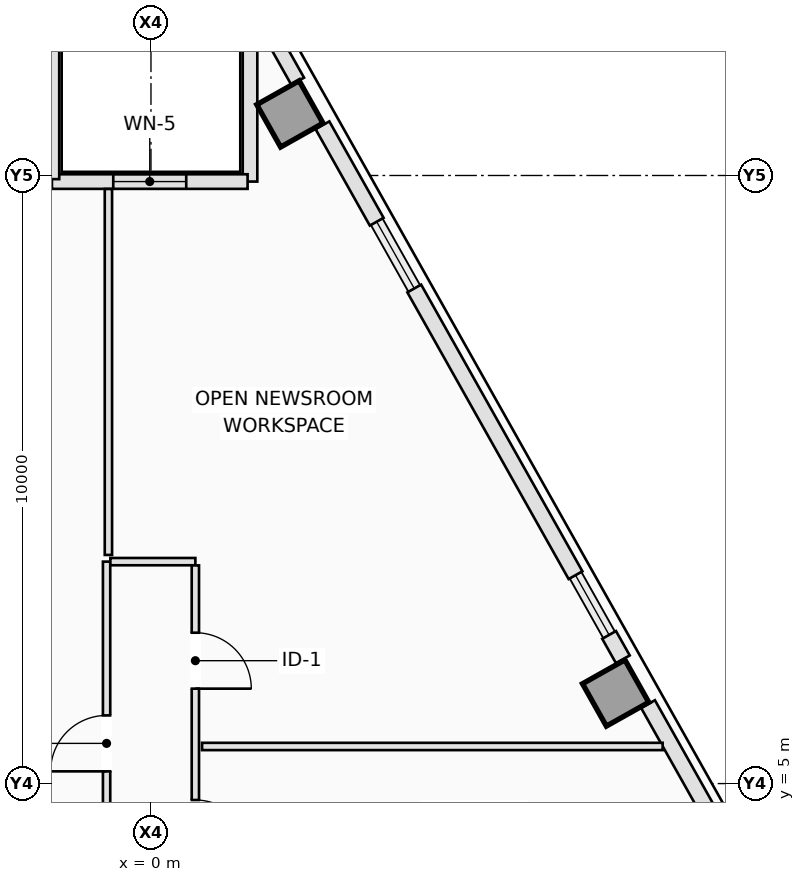
"""IFC4 building model, lengths in metres.
Left out: names, types, materials, properties, quantities, classifications, styles, units other than length and angle.
Written with IfcOpenShell. Run it as: python <this file> out.ifc"""

import sys

from ifc_helpers import new_model, si_unit, direction, frame, frame_2d, origin, origin_2d, place, context, subcontext, project, spatial, rectangle, extrude, element, fill, save


model = new_model("IFC4")
c1 = context("Model", 3, precision=1e-05, world=origin(), true_north=direction((0.0, 1.0)))
c2 = subcontext(c1, "Body", "Model", "MODEL_VIEW")
j1 = project(units=[si_unit("LENGTHUNIT", "METRE"), si_unit("PLANEANGLEUNIT", "RADIAN")], contexts=[c1])
p1 = place(None, origin())
s1 = spatial("IfcSite", under=j1, at=p1, CompositionType="ELEMENT")
p2 = place(p1, origin())
s2 = spatial("IfcBuilding", under=s1, at=p2, CompositionType="ELEMENT")
p3 = place(p2, frame((0.0, 0.0, 228.9)))
s3 = spatial("IfcBuildingStorey", under=s2, at=p3, CompositionType="ELEMENT", Elevation=228.9)
for number, where, z_axis, x_axis in (
    (1, (7.642, 6.489, 0.0), (0.0, 0.0, 1.0), (0.872, 0.49, 0.0)),
    (2, (2.285, 16.012, 0.0), (0.0, 0.0, 1.0), (0.872, 0.49, 0.0)),
):
    element("IfcColumn", number, at=place(p3, frame(where, z_axis=z_axis, x_axis=x_axis)), inside=s3, PredefinedType="COLUMN", context=c2, shape_type="SweptSolid", body=[
        extrude(rectangle(XDim=0.8, YDim=0.8, at=origin_2d()), origin(), (0.0, 0.0, 1.0), 3.5),
    ])
p4 = place(p3, frame((1.95, 17.373, 0.0), z_axis=(0.0, 0.0, 1.0), x_axis=(0.490199895283, -0.871610040479, 0.0)))
e3 = element("IfcWall", 3, at=p4, inside=s3, PredefinedType="STANDARD", context=c2, shape_type="SweptSolid", body=[
    extrude(rectangle(XDim=0.945, YDim=0.24, at=frame_2d((0.472, 0.0))), origin(), (0.0, 0.0, 1.0), 3.25),
])
p5 = place(p3, frame((2.82, 15.826, 0.0), z_axis=(0.0, 0.0, 1.0), x_axis=(0.490261239633, -0.871575537125, 0.0)))
e4 = element("IfcWall", 4, at=p5, inside=s3, PredefinedType="STANDARD", context=c2, shape_type="SweptSolid", body=[
    extrude(rectangle(XDim=1.82, YDim=0.26, at=frame_2d((0.91, 0.0))), origin(), (0.0, 0.0, 1.0), 3.25),
])
p6 = place(p3, frame((4.33, 13.142, 0.0), z_axis=(0.0, 0.0, 1.0), x_axis=(0.490265525523, -0.871573126297, 0.0)))
e5 = element("IfcWall", 5, at=p6, inside=s3, PredefinedType="STANDARD", context=c2, shape_type="SweptSolid", body=[
    extrude(rectangle(XDim=5.409, YDim=0.26, at=frame_2d((2.705, 0.0))), origin(), (0.0, 0.0, 1.0), 3.25),
])
p7 = place(p3, frame((7.534, 7.445, 0.0), z_axis=(0.0, 0.0, 1.0), x_axis=(0.490412424957, -0.871490478116, 0.0)))
e6 = element("IfcWall", 6, at=p7, inside=s3, PredefinedType="STANDARD", context=c2, shape_type="SweptSolid", body=[
    extrude(rectangle(XDim=0.46, YDim=0.26, at=frame_2d((0.23, 0.0))), origin(), (0.0, 0.0, 1.0), 3.25),
])
p8 = place(p3, frame((8.174, 6.307, 0.0), z_axis=(0.0, 0.0, 1.0), x_axis=(0.490269447258, -0.871570920284, 0.0)))
e7 = element("IfcWall", 7, at=p8, inside=s3, PredefinedType="STANDARD", context=c2, shape_type="SweptSolid", body=[
    extrude(rectangle(XDim=4.237, YDim=0.26, at=frame_2d((2.118, 0.0))), origin(), (0.0, 0.0, 1.0), 3.25),
])
p9 = place(p3, frame((1.629, 17.4, 0.0), z_axis=(0.0, 0.0, 1.0), x_axis=(0.0, -1.0, 0.0)))
e8 = element("IfcWall", 8, at=p9, inside=s3, PredefinedType="STANDARD", context=c2, shape_type="SweptSolid", body=[
    extrude(rectangle(XDim=2.5, YDim=0.24, at=frame_2d((1.25, 0.0))), origin(), (0.0, 0.0, 1.0), 3.25),
])
p10 = place(p3, frame((1.589, 14.9, 0.0), z_axis=(0.0, 0.0, 1.0), x_axis=(-1.0, 0.0, 0.0)))
e9 = element("IfcWall", 9, at=p10, inside=s3, PredefinedType="STANDARD", context=c2, shape_type="SweptSolid", body=[
    extrude(rectangle(XDim=3.218, YDim=0.24, at=frame_2d((1.609, 0.0))), origin(), (0.0, 0.0, 1.0), 3.25),
])
p11 = place(p10, frame((1.009, 0.0, 0.9)))
e10 = element("IfcOpeningElement", 10, at=p11, cuts=e9, PredefinedType="OPENING", context=c2, shape_type="SweptSolid", body=[
    extrude(rectangle(XDim=1.2, YDim=1.8, at=frame_2d((0.6, 0.9))), frame((0.0, 0.13, 0.0), z_axis=(0.0, -1.0, 0.0), x_axis=(1.0, 0.0, 0.0)), (0.0, 0.0, 1.0), 0.26),
])
p12 = place(p3, frame((-1.629, 14.94, 0.0), z_axis=(0.0, 0.0, 1.0), x_axis=(0.0, 1.0, 0.0)))
e11 = element("IfcWall", 11, at=p12, inside=s3, PredefinedType="STANDARD", context=c2, shape_type="SweptSolid", body=[
    extrude(rectangle(XDim=2.46, YDim=0.24, at=frame_2d((1.23, 0.0))), origin(), (0.0, 0.0, 1.0), 3.25),
])
p13 = place(p3, frame((-0.73, -2.668, 0.0), z_axis=(0.0, 0.0, 1.0), x_axis=(0.0, 1.0, 0.0)))
e12 = element("IfcWall", 12, at=p13, inside=s3, PredefinedType="PARTITIONING", context=c2, shape_type="SweptSolid", body=[
    extrude(rectangle(XDim=11.318, YDim=0.12, at=frame_2d((5.659, 0.0))), origin(), (0.0, 0.0, 1.0), 3.25),
])
p14 = place(p13, frame((7.869, 0.0, 0.0)))
e13 = element("IfcOpeningElement", 13, at=p14, cuts=e12, PredefinedType="OPENING", context=c2, shape_type="SweptSolid", body=[
    extrude(rectangle(XDim=0.92, YDim=2.12, at=frame_2d((0.46, 1.06))), frame((0.0, 0.07, 0.0), z_axis=(0.0, -1.0, 0.0), x_axis=(1.0, 0.0, 0.0)), (0.0, 0.0, 1.0), 0.14),
])
p15 = place(p13, frame((2.417, 0.0, 0.0)))
e14 = element("IfcOpeningElement", 14, at=p15, cuts=e12, PredefinedType="OPENING", context=c2, shape_type="SweptSolid", body=[
    extrude(rectangle(XDim=0.92, YDim=2.12, at=frame_2d((0.46, 1.06))), frame((0.0, 0.07, 0.0), z_axis=(0.0, -1.0, 0.0), x_axis=(1.0, 0.0, 0.0)), (0.0, 0.0, 1.0), 0.14),
])
p16 = place(p3, frame((-0.668, 8.65, 0.0), z_axis=(0.0, 0.0, 1.0), x_axis=(1.0, 0.0, 0.0)))
e15 = element("IfcWall", 15, at=p16, inside=s3, PredefinedType="PARTITIONING", context=c2, shape_type="SweptSolid", body=[
    extrude(rectangle(XDim=1.398, YDim=0.12, at=frame_2d((0.699, 0.0))), origin(), (0.0, 0.0, 1.0), 3.25),
])
p17 = place(p3, frame((0.73, 8.588, 0.0), z_axis=(0.0, 0.0, 1.0), x_axis=(0.0, -1.0, 0.0)))
e16 = element("IfcWall", 16, at=p17, inside=s3, PredefinedType="PARTITIONING", context=c2, shape_type="SweptSolid", body=[
    extrude(rectangle(XDim=11.318, YDim=0.12, at=frame_2d((5.659, 0.0))), origin(), (0.0, 0.0, 1.0), 3.25),
])
p18 = place(p17, frame((1.107, 0.0, 0.0)))
e17 = element("IfcOpeningElement", 17, at=p18, cuts=e16, PredefinedType="OPENING", context=c2, shape_type="SweptSolid", body=[
    extrude(rectangle(XDim=0.92, YDim=2.12, at=frame_2d((0.46, 1.06))), frame((0.0, 0.07, 0.0), z_axis=(0.0, -1.0, 0.0), x_axis=(1.0, 0.0, 0.0)), (0.0, 0.0, 1.0), 0.14),
])
p19 = place(p17, frame((3.858, 0.0, 0.0)))
e18 = element("IfcOpeningElement", 18, at=p19, cuts=e16, PredefinedType="OPENING", context=c2, shape_type="SweptSolid", body=[
    extrude(rectangle(XDim=0.92, YDim=2.12, at=frame_2d((0.46, 1.06))), frame((0.0, 0.07, 0.0), z_axis=(0.0, -1.0, 0.0), x_axis=(1.0, 0.0, 0.0)), (0.0, 0.0, 1.0), 0.14),
])
p20 = place(p17, frame((7.919, 0.0, 0.0)))
e19 = element("IfcOpeningElement", 19, at=p20, cuts=e16, PredefinedType="OPENING", context=c2, shape_type="SweptSolid", body=[
    extrude(rectangle(XDim=0.92, YDim=2.12, at=frame_2d((0.46, 1.06))), frame((0.0, 0.07, 0.0), z_axis=(0.0, -1.0, 0.0), x_axis=(1.0, 0.0, 0.0)), (0.0, 0.0, 1.0), 0.14),
])
p21 = place(p3, frame((-0.7, 8.76, 0.0), z_axis=(0.0, 0.0, 1.0), x_axis=(0.0, 1.0, 0.0)))
e20 = element("IfcWall", 20, at=p21, inside=s3, PredefinedType="PARTITIONING", context=c2, shape_type="SweptSolid", body=[
    extrude(rectangle(XDim=6.018, YDim=0.12, at=frame_2d((3.009, 0.0))), origin(), (0.0, 0.0, 1.0), 3.25),
])
p22 = place(p3, frame((8.415, 5.61, 0.0), z_axis=(0.0, 0.0, 1.0), x_axis=(-1.0, 0.0, 0.0)))
e21 = element("IfcWall", 21, at=p22, inside=s3, PredefinedType="PARTITIONING", context=c2, shape_type="SweptSolid", body=[
    extrude(rectangle(XDim=7.575, YDim=0.12, at=frame_2d((3.787, 0.0))), origin(), (0.0, 0.0, 1.0), 3.25),
])
p23 = place(p11, origin())
e22 = element("IfcWindow", 22, at=p23, inside=s3, PartitioningType="SINGLE_PANEL", PredefinedType="WINDOW", context=c2, shape_type="SweptSolid", body=[
    extrude(rectangle(XDim=1.2, YDim=1.8, at=frame_2d((0.6, 0.9))), frame((0.0, 0.03, 0.0), z_axis=(0.0, -1.0, 0.0), x_axis=(1.0, 0.0, 0.0)), (0.0, 0.0, 1.0), 0.06),
])
fill(e10, e22)
p24 = place(p18, origin())
e23 = element("IfcDoor", 23, at=p24, inside=s3, OperationType="SINGLE_SWING_RIGHT", PredefinedType="DOOR", context=c2, shape_type="SweptSolid", body=[
    extrude(rectangle(XDim=0.92, YDim=2.12, at=frame_2d((0.46, 1.06))), frame((0.0, 0.025, 0.0), z_axis=(0.0, -1.0, 0.0), x_axis=(1.0, 0.0, 0.0)), (0.0, 0.0, 1.0), 0.05),
])
fill(e17, e23)
p25 = place(p14, origin())
e24 = element("IfcDoor", 24, at=p25, inside=s3, OperationType="SINGLE_SWING_LEFT", PredefinedType="DOOR", context=c2, shape_type="SweptSolid", body=[
    extrude(rectangle(XDim=0.92, YDim=2.12, at=frame_2d((0.46, 1.06))), frame((0.0, 0.025, 0.0), z_axis=(0.0, -1.0, 0.0), x_axis=(1.0, 0.0, 0.0)), (0.0, 0.0, 1.0), 0.05),
])
fill(e13, e24)
p26 = place(p19, origin())
e25 = element("IfcDoor", 25, at=p26, inside=s3, OperationType="SINGLE_SWING_RIGHT", PredefinedType="DOOR", context=c2, shape_type="SweptSolid", body=[
    extrude(rectangle(XDim=0.92, YDim=2.12, at=frame_2d((0.46, 1.06))), frame((0.0, 0.025, 0.0), z_axis=(0.0, -1.0, 0.0), x_axis=(1.0, 0.0, 0.0)), (0.0, 0.0, 1.0), 0.05),
])
fill(e18, e25)
save(model, sys.argv[1])
